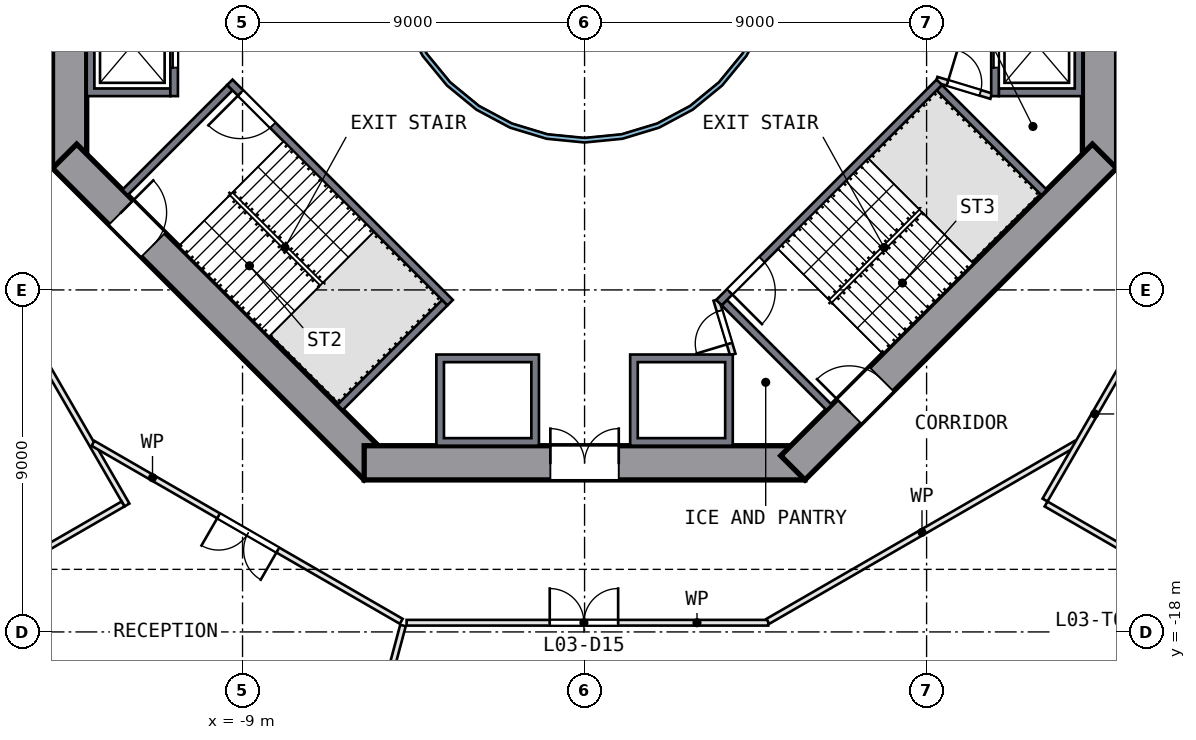
"""IFC4 building model, lengths in metres.
Left out: names, types, materials, properties, quantities, classifications, styles, units other than length and angle.
Written with IfcOpenShell. Run it as: python <this file> out.ifc"""

import sys

from ifc_helpers import new_model, si_unit, direction, frame, frame_2d, origin, place, context, subcontext, project, spatial, polyline, rectangle, outline, extrude, element, fill, save


model = new_model("IFC4")
c1 = context("Model", 3, precision=1e-05, world=origin(), true_north=direction((0.0, 1.0)))
c2 = subcontext(c1, "Body", "Model", "MODEL_VIEW")
j1 = project(units=[si_unit("LENGTHUNIT", "METRE"), si_unit("PLANEANGLEUNIT", "RADIAN")], contexts=[c1])
p1 = place(None, origin())
s1 = spatial("IfcSite", under=j1, at=p1, CompositionType="ELEMENT")
p2 = place(p1, origin())
s2 = spatial("IfcBuilding", under=s1, at=p2, CompositionType="ELEMENT")
p3 = place(p2, frame((0.0, 0.0, 19.0)))
s3 = spatial("IfcBuildingStorey", under=s2, at=p3, CompositionType="ELEMENT", Elevation=19.0)
p4 = place(p3, frame((13.55, -5.799, 0.0), z_axis=(0.0, 0.0, 1.0), x_axis=(0.0, 1.0, 0.0)))
e1 = element("IfcWall", 1, at=p4, inside=s3, PredefinedType="SHEAR", context=c2, shape_type="SweptSolid", body=[
    extrude(rectangle(XDim=11.598, YDim=0.9, at=frame_2d((5.799, 0.0))), origin(), (0.0, 0.0, 1.0), 4.5),
])
p5 = place(p4, frame((4.899, 0.0, 0.0)))
e2 = element("IfcOpeningElement", 2, at=p5, cuts=e1, PredefinedType="OPENING", context=c2, shape_type="SweptSolid", body=[
    extrude(rectangle(XDim=1.8, YDim=2.1, at=frame_2d((0.9, 1.05))), frame((0.0, 0.46, 0.0), z_axis=(0.0, -1.0, 0.0), x_axis=(1.0, 0.0, 0.0)), (0.0, 0.0, 1.0), 0.92),
])
p6 = place(p3, frame((-13.55, 5.799, 0.0), z_axis=(0.0, 0.0, 1.0), x_axis=(0.0, -1.0, 0.0)))
e3 = element("IfcWall", 3, at=p6, inside=s3, PredefinedType="SHEAR", context=c2, shape_type="SweptSolid", body=[
    extrude(rectangle(XDim=11.598, YDim=0.9, at=frame_2d((5.799, 0.0))), origin(), (0.0, 0.0, 1.0), 4.5),
])
p7 = place(p6, frame((4.899, 0.0, 0.0)))
e4 = element("IfcOpeningElement", 4, at=p7, cuts=e3, PredefinedType="OPENING", context=c2, shape_type="SweptSolid", body=[
    extrude(rectangle(XDim=1.8, YDim=2.1, at=frame_2d((0.9, 1.05))), frame((0.0, 0.46, 0.0), z_axis=(0.0, -1.0, 0.0), x_axis=(1.0, 0.0, 0.0)), (0.0, 0.0, 1.0), 0.92),
])
p8 = place(p3, frame((-13.682, -5.481, 0.0), z_axis=(0.0, 0.0, 1.0), x_axis=(0.707106781, -0.707106781, 0.0)))
e5 = element("IfcWall", 5, at=p8, inside=s3, PredefinedType="SHEAR", context=c2, shape_type="SweptSolid", body=[
    extrude(rectangle(XDim=11.598, YDim=0.9, at=frame_2d((5.799, 0.0))), origin(), (0.0, 0.0, 1.0), 4.5),
])
p9 = place(p8, frame((2.099, 0.0, 0.0)))
e6 = element("IfcOpeningElement", 6, at=p9, cuts=e5, PredefinedType="OPENING", context=c2, shape_type="SweptSolid", body=[
    extrude(rectangle(XDim=1.2, YDim=2.1, at=frame_2d((0.6, 1.05))), frame((0.0, 0.46, 0.0), z_axis=(0.0, -1.0, 0.0), x_axis=(1.0, 0.0, 0.0)), (0.0, 0.0, 1.0), 0.92),
])
p10 = place(p3, frame((-5.799, -13.55, 0.0), z_axis=(0.0, 0.0, 1.0), x_axis=(1.0, 0.0, 0.0)))
e7 = element("IfcWall", 7, at=p10, inside=s3, PredefinedType="SHEAR", context=c2, shape_type="SweptSolid", body=[
    extrude(rectangle(XDim=11.598, YDim=0.9, at=frame_2d((5.799, 0.0))), origin(), (0.0, 0.0, 1.0), 4.5),
])
p11 = place(p10, frame((4.899, 0.0, 0.0)))
e8 = element("IfcOpeningElement", 8, at=p11, cuts=e7, PredefinedType="OPENING", context=c2, shape_type="SweptSolid", body=[
    extrude(rectangle(XDim=1.8, YDim=2.1, at=frame_2d((0.9, 1.05))), frame((0.0, 0.46, 0.0), z_axis=(0.0, -1.0, 0.0), x_axis=(1.0, 0.0, 0.0)), (0.0, 0.0, 1.0), 0.92),
])
p12 = place(p3, frame((5.481, -13.682, 0.0), z_axis=(0.0, 0.0, 1.0), x_axis=(0.707106781, 0.707106781, 0.0)))
e9 = element("IfcWall", 9, at=p12, inside=s3, PredefinedType="SHEAR", context=c2, shape_type="SweptSolid", body=[
    extrude(rectangle(XDim=11.598, YDim=0.9, at=frame_2d((5.799, 0.0))), origin(), (0.0, 0.0, 1.0), 4.5),
])
p13 = place(p12, frame((2.099, 0.0, 0.0)))
e10 = element("IfcOpeningElement", 10, at=p13, cuts=e9, PredefinedType="OPENING", context=c2, shape_type="SweptSolid", body=[
    extrude(rectangle(XDim=1.2, YDim=2.1, at=frame_2d((0.6, 1.05))), frame((0.0, 0.46, 0.0), z_axis=(0.0, -1.0, 0.0), x_axis=(1.0, 0.0, 0.0)), (0.0, 0.0, 1.0), 0.92),
])
p14 = place(p3, frame((-17.828, -17.637, 0.0), z_axis=(0.0, 0.0, 1.0), x_axis=(0.866029009, -0.499993756, 0.0)))
e11 = element("IfcWall", 11, at=p14, inside=s3, PredefinedType="SOLIDWALL", context=c2, shape_type="SweptSolid", body=[
    extrude(rectangle(XDim=13.242, YDim=0.14, at=frame_2d((6.621, 0.0))), origin(), (0.0, 0.0, 1.0), 4.05),
])
p15 = place(p14, frame((1.46, 0.0, 0.9)))
e12 = element("IfcOpeningElement", 12, at=p15, cuts=e11, PredefinedType="OPENING", context=c2, shape_type="SweptSolid", body=[
    extrude(rectangle(XDim=3.6, YDim=2.4, at=frame_2d((1.8, 1.2))), frame((0.0, 0.08, 0.0), z_axis=(0.0, -1.0, 0.0), x_axis=(1.0, 0.0, 0.0)), (0.0, 0.0, 1.0), 0.16),
])
p16 = place(p14, frame((8.215, 0.0, 0.9)))
e13 = element("IfcOpeningElement", 13, at=p16, cuts=e11, PredefinedType="OPENING", context=c2, shape_type="SweptSolid", body=[
    extrude(rectangle(XDim=3.0, YDim=2.4, at=frame_2d((1.5, 1.2))), frame((0.0, 0.08, 0.0), z_axis=(0.0, -1.0, 0.0), x_axis=(1.0, 0.0, 0.0)), (0.0, 0.0, 1.0), 0.16),
])
p17 = place(p3, frame((6.603, -24.118, 0.0), z_axis=(0.0, 0.0, 1.0), x_axis=(0.866023287, 0.500003667, 0.0)))
e14 = element("IfcWall", 14, at=p17, inside=s3, PredefinedType="SOLIDWALL", context=c2, shape_type="SweptSolid", body=[
    extrude(rectangle(XDim=12.801, YDim=0.14, at=frame_2d((6.4, 0.0))), origin(), (0.0, 0.0, 1.0), 4.05),
])
p18 = place(p17, frame((1.748, 0.0, 0.9)))
e15 = element("IfcOpeningElement", 15, at=p18, cuts=e14, PredefinedType="OPENING", context=c2, shape_type="SweptSolid", body=[
    extrude(rectangle(XDim=3.0, YDim=2.4, at=frame_2d((1.5, 1.2))), frame((0.0, 0.08, 0.0), z_axis=(0.0, -1.0, 0.0), x_axis=(1.0, 0.0, 0.0)), (0.0, 0.0, 1.0), 0.16),
])
p19 = place(p17, frame((8.802, 0.0, 0.0)))
e16 = element("IfcOpeningElement", 16, at=p19, cuts=e14, PredefinedType="OPENING", context=c2, shape_type="SweptSolid", body=[
    extrude(rectangle(XDim=1.8, YDim=2.4, at=frame_2d((0.9, 1.2))), frame((0.0, 0.08, 0.0), z_axis=(0.0, -1.0, 0.0), x_axis=(1.0, 0.0, 0.0)), (0.0, 0.0, 1.0), 0.16),
])
p20 = place(p3, origin())
e17 = element("IfcWall", 17, at=p20, inside=s3, PredefinedType="SOLIDWALL", context=c2, shape_type="SweptSolid", body=[
    extrude(outline(polyline([(13.1, -3.9), (10.9, -3.9), (10.9, -3.7), (12.9, -3.7), (12.9, -1.4), (10.9, -1.4), (10.9, -1.2), (13.1, -1.2), (13.1, -3.9)])), origin(), (0.0, 0.0, 1.0), 4.05),
])
p21 = place(p3, frame((10.8, -1.2, 0.0), z_axis=(0.0, 0.0, 1.0), x_axis=(0.0, -1.0, 0.0)))
e18 = element("IfcWall", 18, at=p21, inside=s3, PredefinedType="SOLIDWALL", context=c2, shape_type="SweptSolid", body=[
    extrude(rectangle(XDim=2.7, YDim=0.2, at=frame_2d((1.35, 0.0))), origin(), (0.0, 0.0, 1.0), 4.05),
])
p22 = place(p21, frame((0.75, 0.0, 0.0)))
e19 = element("IfcOpeningElement", 19, at=p22, cuts=e18, PredefinedType="OPENING", context=c2, shape_type="SweptSolid", body=[
    extrude(rectangle(XDim=1.2, YDim=2.1, at=frame_2d((0.6, 1.05))), frame((0.0, 0.11, 0.0), z_axis=(0.0, -1.0, 0.0), x_axis=(1.0, 0.0, 0.0)), (0.0, 0.0, 1.0), 0.22),
])
p23 = place(p3, origin())
e20 = element("IfcWall", 20, at=p23, inside=s3, PredefinedType="SOLIDWALL", context=c2, shape_type="SweptSolid", body=[
    extrude(outline(polyline([(-13.1, -3.9), (-13.1, -1.2), (-10.9, -1.2), (-10.9, -1.4), (-12.9, -1.4), (-12.9, -3.7), (-10.9, -3.7), (-10.9, -3.9), (-13.1, -3.9)])), origin(), (0.0, 0.0, 1.0), 4.05),
])
p24 = place(p3, frame((-10.8, -1.2, 0.0), z_axis=(0.0, 0.0, 1.0), x_axis=(0.0, -1.0, 0.0)))
e21 = element("IfcWall", 21, at=p24, inside=s3, PredefinedType="SOLIDWALL", context=c2, shape_type="SweptSolid", body=[
    extrude(rectangle(XDim=2.7, YDim=0.2, at=frame_2d((1.35, 0.0))), origin(), (0.0, 0.0, 1.0), 4.05),
])
p25 = place(p24, frame((0.75, 0.0, 0.0)))
e22 = element("IfcOpeningElement", 22, at=p25, cuts=e21, PredefinedType="OPENING", context=c2, shape_type="SweptSolid", body=[
    extrude(rectangle(XDim=1.2, YDim=2.1, at=frame_2d((0.6, 1.05))), frame((0.0, 0.11, 0.0), z_axis=(0.0, -1.0, 0.0), x_axis=(1.0, 0.0, 0.0)), (0.0, 0.0, 1.0), 0.22),
])
p26 = place(p3, origin())
e23 = element("IfcWall", 23, at=p26, inside=s3, PredefinedType="SOLIDWALL", context=c2, shape_type="SweptSolid", body=[
    extrude(outline(polyline([(-1.2, -13.1), (-3.9, -13.1), (-3.9, -10.7), (-1.2, -10.7), (-1.2, -13.1)]), holes=[polyline([(-3.7, -10.9), (-3.7, -12.9), (-1.4, -12.9), (-1.4, -10.9), (-3.7, -10.9)])]), origin(), (0.0, 0.0, 1.0), 4.05),
])
p27 = place(p3, origin())
e24 = element("IfcWall", 24, at=p27, inside=s3, PredefinedType="SOLIDWALL", context=c2, shape_type="SweptSolid", body=[
    extrude(outline(polyline([(3.9, -10.7), (3.9, -13.1), (1.2, -13.1), (1.2, -10.7), (3.9, -10.7)]), holes=[polyline([(1.4, -12.9), (3.7, -12.9), (3.7, -10.9), (1.4, -10.9), (1.4, -12.9)])]), origin(), (0.0, 0.0, 1.0), 4.05),
])
p28 = place(p3, frame((-3.535, -9.334, 0.0), z_axis=(0.0, 0.0, 1.0), x_axis=(-0.707106781, 0.707106781, 0.0)))
e25 = element("IfcWall", 25, at=p28, inside=s3, PredefinedType="SOLIDWALL", context=c2, shape_type="SweptSolid", body=[
    extrude(rectangle(XDim=8.2, YDim=0.2, at=frame_2d((4.1, 0.0))), origin(), (0.0, 0.0, 1.0), 4.05),
])
p29 = place(p28, frame((6.6, 0.0, 0.0)))
e26 = element("IfcOpeningElement", 26, at=p29, cuts=e25, PredefinedType="OPENING", context=c2, shape_type="SweptSolid", body=[
    extrude(rectangle(XDim=1.2, YDim=2.1, at=frame_2d((0.6, 1.05))), frame((0.0, 0.11, 0.0), z_axis=(0.0, -1.0, 0.0), x_axis=(1.0, 0.0, 0.0)), (0.0, 0.0, 1.0), 0.22),
])
for number, where, z_axis, x_axis in (
    (27, (-9.334, -3.677, 0.0), (0.0, 0.0, 1.0), (-0.707, -0.707, 0.0)),
    (28, (-3.677, -9.334, 0.0), (0.0, 0.0, 1.0), (-0.707, -0.707, 0.0)),
):
    element("IfcWall", number, at=place(p3, frame(where, z_axis=z_axis, x_axis=x_axis)), inside=s3, PredefinedType="SOLIDWALL", context=c2, shape_type="SweptSolid", body=[
        extrude(rectangle(XDim=3.9, YDim=0.2, at=frame_2d((1.95, 0.0))), origin(), (0.0, 0.0, 1.0), 4.05),
    ])
p30 = place(p3, frame((9.334, -3.535, 0.0), z_axis=(0.0, 0.0, 1.0), x_axis=(-0.707106781, -0.707106781, 0.0)))
e29 = element("IfcWall", 29, at=p30, inside=s3, PredefinedType="SOLIDWALL", context=c2, shape_type="SweptSolid", body=[
    extrude(rectangle(XDim=8.2, YDim=0.2, at=frame_2d((4.1, 0.0))), origin(), (0.0, 0.0, 1.0), 4.05),
])
p31 = place(p30, frame((6.6, 0.0, 0.0)))
e30 = element("IfcOpeningElement", 30, at=p31, cuts=e29, PredefinedType="OPENING", context=c2, shape_type="SweptSolid", body=[
    extrude(rectangle(XDim=1.2, YDim=2.1, at=frame_2d((0.6, 1.05))), frame((0.0, 0.11, 0.0), z_axis=(0.0, -1.0, 0.0), x_axis=(1.0, 0.0, 0.0)), (0.0, 0.0, 1.0), 0.22),
])
for number, where, z_axis, x_axis in (
    (31, (3.677, -9.334, 0.0), (0.0, 0.0, 1.0), (0.707, -0.707, 0.0)),
    (32, (9.334, -3.677, 0.0), (0.0, 0.0, 1.0), (0.707, -0.707, 0.0)),
):
    element("IfcWall", number, at=place(p3, frame(where, z_axis=z_axis, x_axis=x_axis)), inside=s3, PredefinedType="SOLIDWALL", context=c2, shape_type="SweptSolid", body=[
        extrude(rectangle(XDim=3.9, YDim=0.2, at=frame_2d((1.95, 0.0))), origin(), (0.0, 0.0, 1.0), 4.05),
    ])
p32 = place(p3, frame((3.9, -10.7, 0.0), z_axis=(0.0, 0.0, 1.0), x_axis=(-0.289808785, 0.957084567, 0.0)))
e33 = element("IfcWall", 33, at=p32, inside=s3, PredefinedType="PARTITIONING", context=c2, shape_type="SweptSolid", body=[
    extrude(rectangle(XDim=1.501, YDim=0.15, at=frame_2d((0.75, 0.0))), origin(), (0.0, 0.0, 1.0), 4.05),
])
p33 = place(p32, frame((0.301, 0.0, 0.0)))
e34 = element("IfcOpeningElement", 34, at=p33, cuts=e33, PredefinedType="OPENING", context=c2, shape_type="SweptSolid", body=[
    extrude(rectangle(XDim=0.9, YDim=2.1, at=frame_2d((0.45, 1.05))), frame((0.0, 0.085, 0.0), z_axis=(0.0, -1.0, 0.0), x_axis=(1.0, 0.0, 0.0)), (0.0, 0.0, 1.0), 0.17),
])
p34 = place(p3, frame((9.263, -3.465, 0.0), z_axis=(0.0, 0.0, 1.0), x_axis=(0.957084567, -0.289808785, 0.0)))
e35 = element("IfcWall", 35, at=p34, inside=s3, PredefinedType="PARTITIONING", context=c2, shape_type="SweptSolid", body=[
    extrude(rectangle(XDim=1.501, YDim=0.15, at=frame_2d((0.75, 0.0))), origin(), (0.0, 0.0, 1.0), 4.05),
])
p35 = place(p34, frame((0.301, 0.0, 0.0)))
e36 = element("IfcOpeningElement", 36, at=p35, cuts=e35, PredefinedType="OPENING", context=c2, shape_type="SweptSolid", body=[
    extrude(rectangle(XDim=0.9, YDim=2.1, at=frame_2d((0.45, 1.05))), frame((0.0, 0.085, 0.0), z_axis=(0.0, -1.0, 0.0), x_axis=(1.0, 0.0, 0.0)), (0.0, 0.0, 1.0), 0.17),
])
p36 = place(p3, origin())
e37 = element("IfcWall", 37, at=p36, inside=s3, PredefinedType="SOLIDWALL", context=c2, shape_type="SweptSolid", body=[
    extrude(outline(polyline([(5.021, -0.999), (4.73, -1.959), (4.257, -2.844), (3.62, -3.62), (2.844, -4.257), (1.959, -4.73), (0.999, -5.021), (0.0, -5.12), (-0.999, -5.021), (-1.959, -4.73), (-2.844, -4.257), (-3.62, -3.62), (-4.257, -2.844), (-4.73, -1.959), (-5.021, -0.999), (-5.12, 0.0), (-5.021, 0.999), (-4.73, 1.959), (-4.257, 2.844), (-3.62, 3.62), (-2.844, 4.257), (-1.959, 4.73), (-0.999, 5.021), (0.0, 5.12), (0.999, 5.021), (1.959, 4.73), (2.844, 4.257), (3.62, 3.62), (4.257, 2.844), (4.73, 1.959), (5.021, 0.999), (5.12, 0.0), (5.021, -0.999)]), holes=[polyline([(4.904, 0.976), (4.619, 1.913), (4.157, 2.778), (3.535, 3.535), (2.778, 4.157), (1.913, 4.619), (0.976, 4.904), (0.0, 5.0), (-0.976, 4.904), (-1.913, 4.619), (-2.778, 4.157), (-3.535, 3.535), (-4.157, 2.778), (-4.619, 1.913), (-4.904, 0.976), (-5.0, 0.0), (-4.904, -0.976), (-4.619, -1.913), (-4.157, -2.778), (-3.535, -3.535), (-2.778, -4.157), (-1.913, -4.619), (-0.976, -4.904), (0.0, -5.0), (0.976, -4.904), (1.913, -4.619), (2.778, -4.157), (3.535, -3.535), (4.157, -2.778), (4.619, -1.913), (4.904, -0.976), (5.0, 0.0), (4.904, 0.976)])]), origin(), (0.0, 0.0, 1.0), 4.05),
])
p37 = place(p3, frame((-18.642, -3.228, 0.0), z_axis=(0.0, 0.0, 1.0), x_axis=(0.499988223, -0.866032203, 0.0)))
e38 = element("IfcWall", 38, at=p37, inside=s3, PredefinedType="PARTITIONING", context=c2, shape_type="SweptSolid", body=[
    extrude(rectangle(XDim=13.2, YDim=0.15, at=frame_2d((6.6, 0.0))), origin(), (0.0, 0.0, 1.0), 4.05),
])
p38 = place(p3, frame((-16.978, -17.424, 0.0), z_axis=(0.0, 0.0, 1.0), x_axis=(0.866008599, 0.500029105, 0.0)))
e39 = element("IfcWall", 39, at=p38, inside=s3, PredefinedType="PARTITIONING", context=c2, shape_type="SweptSolid", body=[
    extrude(rectangle(XDim=5.582, YDim=0.15, at=frame_2d((2.791, 0.0))), origin(), (0.0, 0.0, 1.0), 4.05),
])
p39 = place(p3, frame((-6.153, -22.965, 0.0), z_axis=(0.0, 0.0, 1.0), x_axis=(0.258843233, 0.965919345, 0.0)))
e40 = element("IfcWall", 40, at=p39, inside=s3, PredefinedType="PARTITIONING", context=c2, shape_type="SweptSolid", body=[
    extrude(rectangle(XDim=5.315, YDim=0.15, at=frame_2d((2.657, 0.0))), origin(), (0.0, 0.0, 1.0), 4.05),
])
p40 = place(p3, frame((-4.823, -17.721, 0.0), z_axis=(0.0, 0.0, 1.0), x_axis=(-0.866037142, 0.499979668, 0.0)))
e41 = element("IfcWall", 41, at=p40, inside=s3, PredefinedType="PARTITIONING", context=c2, shape_type="SweptSolid", body=[
    extrude(rectangle(XDim=9.367, YDim=0.15, at=frame_2d((4.683, 0.0))), origin(), (0.0, 0.0, 1.0), 4.05),
])
p41 = place(p40, frame((3.75, 0.0, 0.0)))
e42 = element("IfcOpeningElement", 42, at=p41, cuts=e41, PredefinedType="OPENING", context=c2, shape_type="SweptSolid", body=[
    extrude(rectangle(XDim=1.8, YDim=2.1, at=frame_2d((0.9, 1.05))), frame((0.0, 0.085, 0.0), z_axis=(0.0, -1.0, 0.0), x_axis=(1.0, 0.0, 0.0)), (0.0, 0.0, 1.0), 0.17),
])
p42 = place(p3, frame((-4.683, -17.758, 0.0), z_axis=(0.0, 0.0, 1.0), x_axis=(1.0, 0.0, 0.0)))
e43 = element("IfcWall", 43, at=p42, inside=s3, PredefinedType="PARTITIONING", context=c2, shape_type="SweptSolid", body=[
    extrude(rectangle(XDim=9.517, YDim=0.15, at=frame_2d((4.758, 0.0))), origin(), (0.0, 0.0, 1.0), 4.05),
])
p43 = place(p42, frame((3.767, 0.0, 0.0)))
e44 = element("IfcOpeningElement", 44, at=p43, cuts=e43, PredefinedType="OPENING", context=c2, shape_type="SweptSolid", body=[
    extrude(rectangle(XDim=1.8, YDim=2.1, at=frame_2d((0.9, 1.05))), frame((0.0, 0.085, 0.0), z_axis=(0.0, -1.0, 0.0), x_axis=(1.0, 0.0, 0.0)), (0.0, 0.0, 1.0), 0.17),
])
p44 = place(p3, frame((12.144, -14.633, 0.0), z_axis=(0.0, 0.0, 1.0), x_axis=(0.866016603, -0.500015243, 0.0)))
e45 = element("IfcWall", 45, at=p44, inside=s3, PredefinedType="PARTITIONING", context=c2, shape_type="SweptSolid", body=[
    extrude(rectangle(XDim=5.582, YDim=0.15, at=frame_2d((2.791, 0.0))), origin(), (0.0, 0.0, 1.0), 4.05),
])
p45 = place(p3, frame((12.935, -13.038, 0.0), z_axis=(0.0, 0.0, 1.0), x_axis=(-0.866037142, -0.499979668, 0.0)))
e46 = element("IfcWall", 46, at=p45, inside=s3, PredefinedType="PARTITIONING", context=c2, shape_type="SweptSolid", body=[
    extrude(rectangle(XDim=9.367, YDim=0.15, at=frame_2d((4.683, 0.0))), origin(), (0.0, 0.0, 1.0), 4.05),
])
p46 = place(p3, frame((12.117, -14.53, 0.0), z_axis=(0.0, 0.0, 1.0), x_axis=(0.500001509, 0.866024532, 0.0)))
e47 = element("IfcWall", 47, at=p46, inside=s3, PredefinedType="PARTITIONING", context=c2, shape_type="SweptSolid", body=[
    extrude(rectangle(XDim=11.183, YDim=0.15, at=frame_2d((5.592, 0.0))), origin(), (0.0, 0.0, 1.0), 4.05),
])
p47 = place(p46, frame((5.433, 0.0, 0.0)))
e48 = element("IfcOpeningElement", 48, at=p47, cuts=e47, PredefinedType="OPENING", context=c2, shape_type="SweptSolid", body=[
    extrude(rectangle(XDim=1.8, YDim=2.1, at=frame_2d((0.9, 1.05))), frame((0.0, 0.085, 0.0), z_axis=(0.0, -1.0, 0.0), x_axis=(1.0, 0.0, 0.0)), (0.0, 0.0, 1.0), 0.17),
])
p48 = place(p15, origin())
e49 = element("IfcWindow", 49, at=p48, inside=s3, PartitioningType="SINGLE_PANEL", PredefinedType="WINDOW", context=c2, shape_type="SweptSolid", body=[
    extrude(rectangle(XDim=3.6, YDim=2.4, at=frame_2d((1.8, 1.2))), frame((0.0, 0.03, 0.0), z_axis=(0.0, -1.0, 0.0), x_axis=(1.0, 0.0, 0.0)), (0.0, 0.0, 1.0), 0.06),
])
fill(e12, e49)
p49 = place(p22, origin())
e50 = element("IfcDoor", 50, at=p49, inside=s3, OperationType="DOUBLE_DOOR_SLIDING", PredefinedType="DOOR", context=c2, shape_type="SweptSolid", body=[
    extrude(rectangle(XDim=1.2, YDim=2.1, at=frame_2d((0.6, 1.05))), frame((0.0, 0.025, 0.0), z_axis=(0.0, -1.0, 0.0), x_axis=(1.0, 0.0, 0.0)), (0.0, 0.0, 1.0), 0.05),
])
fill(e19, e50)
p50 = place(p25, origin())
e51 = element("IfcDoor", 51, at=p50, inside=s3, OperationType="DOUBLE_DOOR_SLIDING", PredefinedType="DOOR", context=c2, shape_type="SweptSolid", body=[
    extrude(rectangle(XDim=1.2, YDim=2.1, at=frame_2d((0.6, 1.05))), frame((0.0, 0.025, 0.0), z_axis=(0.0, -1.0, 0.0), x_axis=(1.0, 0.0, 0.0)), (0.0, 0.0, 1.0), 0.05),
])
fill(e22, e51)
p51 = place(p29, origin())
e52 = element("IfcDoor", 52, at=p51, inside=s3, OperationType="SINGLE_SWING_RIGHT", PredefinedType="DOOR", context=c2, shape_type="SweptSolid", body=[
    extrude(rectangle(XDim=1.2, YDim=2.1, at=frame_2d((0.6, 1.05))), frame((0.0, 0.025, 0.0), z_axis=(0.0, -1.0, 0.0), x_axis=(1.0, 0.0, 0.0)), (0.0, 0.0, 1.0), 0.05),
])
fill(e26, e52)
p52 = place(p31, origin())
e53 = element("IfcDoor", 53, at=p52, inside=s3, OperationType="SINGLE_SWING_RIGHT", PredefinedType="DOOR", context=c2, shape_type="SweptSolid", body=[
    extrude(rectangle(XDim=1.2, YDim=2.1, at=frame_2d((0.6, 1.05))), frame((0.0, 0.025, 0.0), z_axis=(0.0, -1.0, 0.0), x_axis=(1.0, 0.0, 0.0)), (0.0, 0.0, 1.0), 0.05),
])
fill(e30, e53)
p53 = place(p11, origin())
e54 = element("IfcDoor", 54, at=p53, inside=s3, OperationType="DOUBLE_DOOR_SINGLE_SWING", PredefinedType="DOOR", context=c2, shape_type="SweptSolid", body=[
    extrude(rectangle(XDim=1.8, YDim=2.1, at=frame_2d((0.9, 1.05))), frame((0.0, 0.025, 0.0), z_axis=(0.0, -1.0, 0.0), x_axis=(1.0, 0.0, 0.0)), (0.0, 0.0, 1.0), 0.05),
])
fill(e8, e54)
p54 = place(p9, origin())
e55 = element("IfcDoor", 55, at=p54, inside=s3, OperationType="SINGLE_SWING_LEFT", PredefinedType="DOOR", context=c2, shape_type="SweptSolid", body=[
    extrude(rectangle(XDim=1.2, YDim=2.1, at=frame_2d((0.6, 1.05))), frame((0.0, 0.025, 0.0), z_axis=(0.0, -1.0, 0.0), x_axis=(1.0, 0.0, 0.0)), (0.0, 0.0, 1.0), 0.05),
])
fill(e6, e55)
p55 = place(p13, origin())
e56 = element("IfcDoor", 56, at=p55, inside=s3, OperationType="SINGLE_SWING_LEFT", PredefinedType="DOOR", context=c2, shape_type="SweptSolid", body=[
    extrude(rectangle(XDim=1.2, YDim=2.1, at=frame_2d((0.6, 1.05))), frame((0.0, 0.025, 0.0), z_axis=(0.0, -1.0, 0.0), x_axis=(1.0, 0.0, 0.0)), (0.0, 0.0, 1.0), 0.05),
])
fill(e10, e56)
p56 = place(p33, origin())
e57 = element("IfcDoor", 57, at=p56, inside=s3, OperationType="SINGLE_SWING_LEFT", PredefinedType="DOOR", context=c2, shape_type="SweptSolid", body=[
    extrude(rectangle(XDim=0.9, YDim=2.1, at=frame_2d((0.45, 1.05))), frame((0.0, 0.025, 0.0), z_axis=(0.0, -1.0, 0.0), x_axis=(1.0, 0.0, 0.0)), (0.0, 0.0, 1.0), 0.05),
])
fill(e34, e57)
p57 = place(p35, origin())
e58 = element("IfcDoor", 58, at=p57, inside=s3, OperationType="SINGLE_SWING_LEFT", PredefinedType="DOOR", context=c2, shape_type="SweptSolid", body=[
    extrude(rectangle(XDim=0.9, YDim=2.1, at=frame_2d((0.45, 1.05))), frame((0.0, 0.025, 0.0), z_axis=(0.0, -1.0, 0.0), x_axis=(1.0, 0.0, 0.0)), (0.0, 0.0, 1.0), 0.05),
])
fill(e36, e58)
p58 = place(p41, origin())
e59 = element("IfcDoor", 59, at=p58, inside=s3, OperationType="DOUBLE_DOOR_SINGLE_SWING", PredefinedType="DOOR", context=c2, shape_type="SweptSolid", body=[
    extrude(rectangle(XDim=1.8, YDim=2.1, at=frame_2d((0.9, 1.05))), frame((0.0, 0.025, 0.0), z_axis=(0.0, -1.0, 0.0), x_axis=(1.0, 0.0, 0.0)), (0.0, 0.0, 1.0), 0.05),
])
fill(e42, e59)
p59 = place(p43, origin())
e60 = element("IfcDoor", 60, at=p59, inside=s3, OperationType="DOUBLE_DOOR_SINGLE_SWING", PredefinedType="DOOR", context=c2, shape_type="SweptSolid", body=[
    extrude(rectangle(XDim=1.8, YDim=2.1, at=frame_2d((0.9, 1.05))), frame((0.0, 0.025, 0.0), z_axis=(0.0, -1.0, 0.0), x_axis=(1.0, 0.0, 0.0)), (0.0, 0.0, 1.0), 0.05),
])
fill(e44, e60)
save(model, sys.argv[1])
